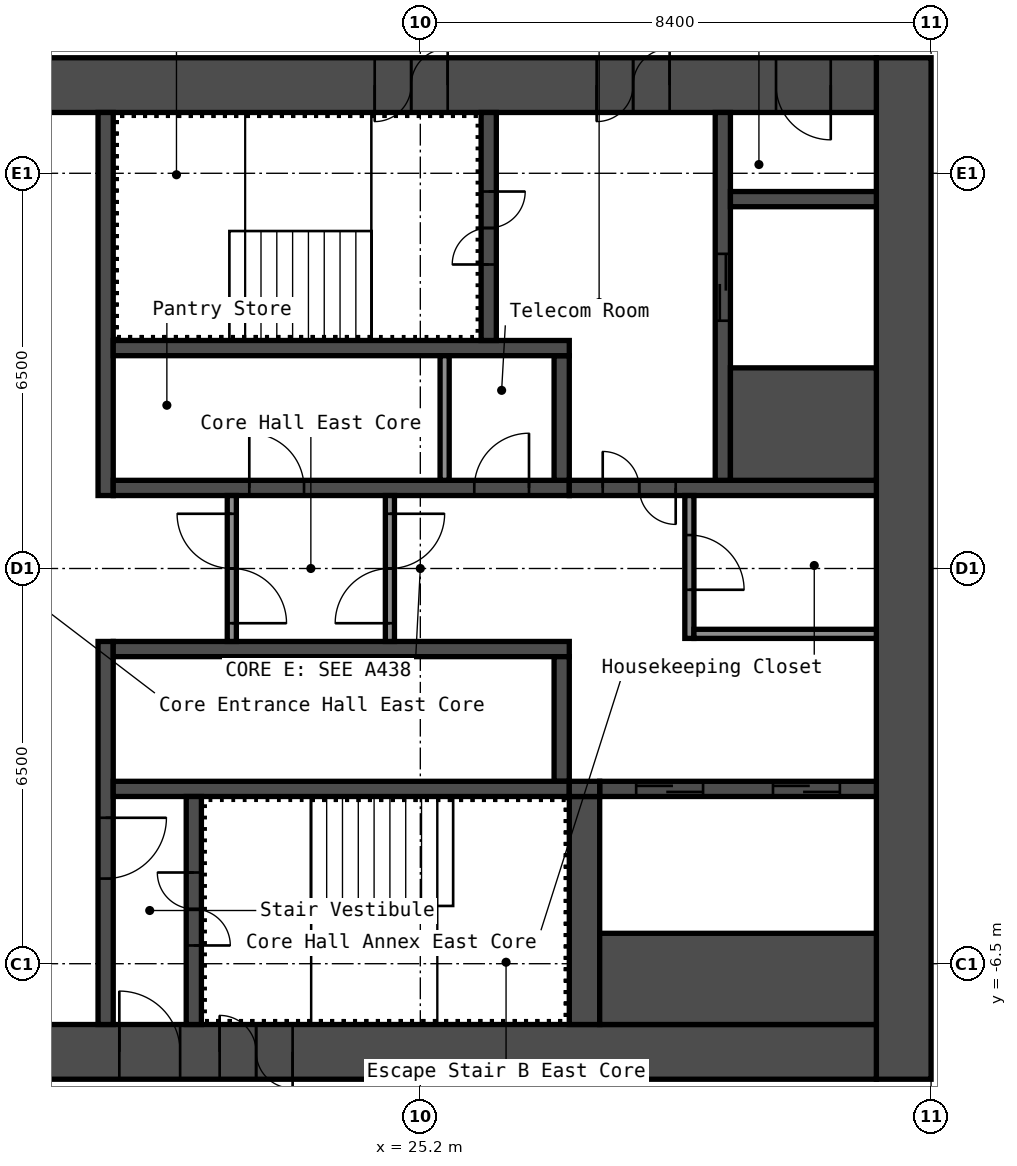
"""IFC4 building model, lengths in metres.
Left out: names, types, materials, properties, quantities, classifications, styles, units other than length and angle.
Written with IfcOpenShell. Run it as: python <this file> out.ifc"""

import sys

from ifc_helpers import new_model, si_unit, direction, frame, frame_2d, origin, place, context, subcontext, project, spatial, rectangle, extrude, element, fill, save


model = new_model("IFC4")
c1 = context("Model", 3, precision=1e-05, world=origin(), true_north=direction((0.0, 1.0)))
c2 = subcontext(c1, "Body", "Model", "MODEL_VIEW")
j1 = project(units=[si_unit("LENGTHUNIT", "METRE"), si_unit("PLANEANGLEUNIT", "RADIAN")], contexts=[c1])
p1 = place(None, origin())
s1 = spatial("IfcSite", under=j1, at=p1, CompositionType="ELEMENT")
p2 = place(p1, origin())
s2 = spatial("IfcBuilding", under=s1, at=p2, CompositionType="ELEMENT")
p3 = place(p2, frame((0.0, 0.0, 264.6)))
s3 = spatial("IfcBuildingStorey", under=s2, at=p3, CompositionType="ELEMENT", Elevation=264.6)
p4 = place(p3, frame((33.15, -8.4, 0.0), z_axis=(0.0, 0.0, 1.0), x_axis=(0.0, 1.0, 0.0)))
e1 = element("IfcWall", 1, at=p4, inside=s3, PredefinedType="SHEAR", context=c2, shape_type="SweptSolid", body=[
    extrude(rectangle(XDim=16.8, YDim=0.9, at=frame_2d((8.4, 0.0))), origin(), (0.0, 0.0, 1.0), 5.55),
])
p5 = place(p3, frame((17.7, 7.95, 0.0), z_axis=(0.0, 0.0, 1.0), x_axis=(1.0, 0.0, 0.0)))
e2 = element("IfcWall", 2, at=p5, inside=s3, PredefinedType="SHEAR", context=c2, shape_type="SweptSolid", body=[
    extrude(rectangle(XDim=15.0, YDim=0.9, at=frame_2d((7.5, 0.0))), origin(), (0.0, 0.0, 1.0), 5.55),
])
p6 = place(p5, frame((10.4, 0.0, 0.0)))
e3 = element("IfcOpeningElement", 3, at=p6, cuts=e2, PredefinedType="OPENING", context=c2, shape_type="SweptSolid", body=[
    extrude(rectangle(XDim=1.2, YDim=2.1, at=frame_2d((0.6, 1.05))), frame((0.0, 0.46, 0.0), z_axis=(0.0, -1.0, 0.0), x_axis=(1.0, 0.0, 0.0)), (0.0, 0.0, 1.0), 0.92),
])
p7 = place(p5, frame((13.35, 0.0, 0.0)))
e4 = element("IfcOpeningElement", 4, at=p7, cuts=e2, PredefinedType="OPENING", context=c2, shape_type="SweptSolid", body=[
    extrude(rectangle(XDim=0.9, YDim=2.1, at=frame_2d((0.45, 1.05))), frame((0.0, 0.46, 0.0), z_axis=(0.0, -1.0, 0.0), x_axis=(1.0, 0.0, 0.0)), (0.0, 0.0, 1.0), 0.92),
])
p8 = place(p5, frame((6.75, 0.0, 0.0)))
e5 = element("IfcOpeningElement", 5, at=p8, cuts=e2, PredefinedType="OPENING", context=c2, shape_type="SweptSolid", body=[
    extrude(rectangle(XDim=1.2, YDim=2.1, at=frame_2d((0.6, 1.05))), frame((0.0, 0.46, 0.0), z_axis=(0.0, -1.0, 0.0), x_axis=(1.0, 0.0, 0.0)), (0.0, 0.0, 1.0), 0.92),
])
p9 = place(p3, frame((17.7, -7.95, 0.0), z_axis=(0.0, 0.0, 1.0), x_axis=(1.0, 0.0, 0.0)))
e6 = element("IfcWall", 6, at=p9, inside=s3, PredefinedType="SHEAR", context=c2, shape_type="SweptSolid", body=[
    extrude(rectangle(XDim=15.0, YDim=0.9, at=frame_2d((7.5, 0.0))), origin(), (0.0, 0.0, 1.0), 5.55),
])
p10 = place(p9, frame((2.55, 0.0, 0.0)))
e7 = element("IfcOpeningElement", 7, at=p10, cuts=e6, PredefinedType="OPENING", context=c2, shape_type="SweptSolid", body=[
    extrude(rectangle(XDim=1.0, YDim=2.1, at=frame_2d((0.5, 1.05))), frame((0.0, 0.46, 0.0), z_axis=(0.0, -1.0, 0.0), x_axis=(1.0, 0.0, 0.0)), (0.0, 0.0, 1.0), 0.92),
])
p11 = place(p9, frame((4.2, 0.0, 0.0)))
e8 = element("IfcOpeningElement", 8, at=p11, cuts=e6, PredefinedType="OPENING", context=c2, shape_type="SweptSolid", body=[
    extrude(rectangle(XDim=1.2, YDim=2.1, at=frame_2d((0.6, 1.05))), frame((0.0, 0.46, 0.0), z_axis=(0.0, -1.0, 0.0), x_axis=(1.0, 0.0, 0.0)), (0.0, 0.0, 1.0), 0.92),
])
p12 = place(p3, frame((20.025, 1.2, 0.0), z_axis=(0.0, 0.0, 1.0), x_axis=(0.0, 1.0, 0.0)))
e9 = element("IfcWall", 9, at=p12, inside=s3, PredefinedType="SHEAR", context=c2, shape_type="SweptSolid", body=[
    extrude(rectangle(XDim=6.3, YDim=0.25, at=frame_2d((3.15, 0.0))), origin(), (0.0, 0.0, 1.0), 5.55),
])
p13 = place(p3, frame((20.025, -7.5, 0.0), z_axis=(0.0, 0.0, 1.0), x_axis=(0.0, 1.0, 0.0)))
e10 = element("IfcWall", 10, at=p13, inside=s3, PredefinedType="SHEAR", context=c2, shape_type="SweptSolid", body=[
    extrude(rectangle(XDim=6.3, YDim=0.25, at=frame_2d((3.15, 0.0))), origin(), (0.0, 0.0, 1.0), 5.55),
])
p14 = place(p13, frame((2.4, 0.0, 0.0)))
e11 = element("IfcOpeningElement", 11, at=p14, cuts=e10, PredefinedType="OPENING", context=c2, shape_type="SweptSolid", body=[
    extrude(rectangle(XDim=1.0, YDim=2.1, at=frame_2d((0.5, 1.05))), frame((0.0, 0.135, 0.0), z_axis=(0.0, -1.0, 0.0), x_axis=(1.0, 0.0, 0.0)), (0.0, 0.0, 1.0), 0.27),
])
p15 = place(p3, frame((20.15, 1.325, 0.0), z_axis=(0.0, 0.0, 1.0), x_axis=(1.0, 0.0, 0.0)))
e12 = element("IfcWall", 12, at=p15, inside=s3, PredefinedType="SHEAR", context=c2, shape_type="SweptSolid", body=[
    extrude(rectangle(XDim=7.5, YDim=0.25, at=frame_2d((3.75, 0.0))), origin(), (0.0, 0.0, 1.0), 5.55),
])
p16 = place(p15, frame((2.238, 0.0, 0.0)))
e13 = element("IfcOpeningElement", 13, at=p16, cuts=e12, PredefinedType="OPENING", context=c2, shape_type="SweptSolid", body=[
    extrude(rectangle(XDim=0.9, YDim=2.1, at=frame_2d((0.45, 1.05))), frame((0.0, 0.135, 0.0), z_axis=(0.0, -1.0, 0.0), x_axis=(1.0, 0.0, 0.0)), (0.0, 0.0, 1.0), 0.27),
])
p17 = place(p15, frame((5.938, 0.0, 0.0)))
e14 = element("IfcOpeningElement", 14, at=p17, cuts=e12, PredefinedType="OPENING", context=c2, shape_type="SweptSolid", body=[
    extrude(rectangle(XDim=0.9, YDim=2.1, at=frame_2d((0.45, 1.05))), frame((0.0, 0.135, 0.0), z_axis=(0.0, -1.0, 0.0), x_axis=(1.0, 0.0, 0.0)), (0.0, 0.0, 1.0), 0.27),
])
p18 = place(p3, frame((27.525, 1.45, 0.0), z_axis=(0.0, 0.0, 1.0), x_axis=(0.0, 1.0, 0.0)))
e15 = element("IfcWall", 15, at=p18, inside=s3, PredefinedType="SHEAR", context=c2, shape_type="SweptSolid", body=[
    extrude(rectangle(XDim=2.05, YDim=0.25, at=frame_2d((1.025, 0.0))), origin(), (0.0, 0.0, 1.0), 5.55),
])
p19 = place(p3, frame((20.15, 3.625, 0.0), z_axis=(0.0, 0.0, 1.0), x_axis=(1.0, 0.0, 0.0)))
e16 = element("IfcWall", 16, at=p19, inside=s3, PredefinedType="SHEAR", context=c2, shape_type="SweptSolid", body=[
    extrude(rectangle(XDim=7.5, YDim=0.25, at=frame_2d((3.75, 0.0))), origin(), (0.0, 0.0, 1.0), 5.55),
])
p20 = place(p3, frame((26.325, 3.75, 0.0), z_axis=(0.0, 0.0, 1.0), x_axis=(0.0, 1.0, 0.0)))
e17 = element("IfcWall", 17, at=p20, inside=s3, PredefinedType="SHEAR", context=c2, shape_type="SweptSolid", body=[
    extrude(rectangle(XDim=3.75, YDim=0.25, at=frame_2d((1.875, 0.0))), origin(), (0.0, 0.0, 1.0), 5.55),
])
p21 = place(p20, frame((1.25, 0.0, 0.0)))
e18 = element("IfcOpeningElement", 18, at=p21, cuts=e17, PredefinedType="OPENING", context=c2, shape_type="SweptSolid", body=[
    extrude(rectangle(XDim=1.2, YDim=2.1, at=frame_2d((0.6, 1.05))), frame((0.0, 0.135, 0.0), z_axis=(0.0, -1.0, 0.0), x_axis=(1.0, 0.0, 0.0)), (0.0, 0.0, 1.0), 0.27),
])
p22 = place(p3, frame((27.65, 1.325, 0.0), z_axis=(0.0, 0.0, 1.0), x_axis=(1.0, 0.0, 0.0)))
e19 = element("IfcWall", 19, at=p22, inside=s3, PredefinedType="SHEAR", context=c2, shape_type="SweptSolid", body=[
    extrude(rectangle(XDim=5.05, YDim=0.25, at=frame_2d((2.525, 0.0))), origin(), (0.0, 0.0, 1.0), 5.55),
])
p23 = place(p22, frame((0.55, 0.0, 0.0)))
e20 = element("IfcOpeningElement", 20, at=p23, cuts=e19, PredefinedType="OPENING", context=c2, shape_type="SweptSolid", body=[
    extrude(rectangle(XDim=1.2, YDim=2.1, at=frame_2d((0.6, 1.05))), frame((0.0, 0.135, 0.0), z_axis=(0.0, -1.0, 0.0), x_axis=(1.0, 0.0, 0.0)), (0.0, 0.0, 1.0), 0.27),
])
p24 = place(p3, frame((30.175, 1.45, 0.0), z_axis=(0.0, 0.0, 1.0), x_axis=(0.0, 1.0, 0.0)))
e21 = element("IfcWall", 21, at=p24, inside=s3, PredefinedType="SHEAR", context=c2, shape_type="SweptSolid", body=[
    extrude(rectangle(XDim=6.05, YDim=0.25, at=frame_2d((3.025, 0.0))), origin(), (0.0, 0.0, 1.0), 5.55),
])
p25 = place(p24, frame((2.625, 0.0, 0.0)))
e22 = element("IfcOpeningElement", 22, at=p25, cuts=e21, PredefinedType="OPENING", context=c2, shape_type="SweptSolid", body=[
    extrude(rectangle(XDim=1.1, YDim=2.1, at=frame_2d((0.55, 1.05))), frame((0.0, 0.135, 0.0), z_axis=(0.0, -1.0, 0.0), x_axis=(1.0, 0.0, 0.0)), (0.0, 0.0, 1.0), 0.27),
])
p26 = place(p3, frame((30.3, 2.375, 0.0), z_axis=(0.0, 0.0, 1.0), x_axis=(1.0, 0.0, 0.0)))
e23 = element("IfcWall", 23, at=p26, inside=s3, PredefinedType="SHEAR", context=c2, shape_type="SweptSolid", body=[
    extrude(rectangle(XDim=2.4, YDim=1.85, at=frame_2d((1.2, 0.0))), origin(), (0.0, 0.0, 1.0), 5.55),
])
p27 = place(p3, frame((30.3, 6.075, 0.0), z_axis=(0.0, 0.0, 1.0), x_axis=(1.0, 0.0, 0.0)))
e24 = element("IfcWall", 24, at=p27, inside=s3, PredefinedType="SHEAR", context=c2, shape_type="SweptSolid", body=[
    extrude(rectangle(XDim=2.4, YDim=0.25, at=frame_2d((1.2, 0.0))), origin(), (0.0, 0.0, 1.0), 5.55),
])
p28 = place(p3, frame((20.15, -1.325, 0.0), z_axis=(0.0, 0.0, 1.0), x_axis=(1.0, 0.0, 0.0)))
e25 = element("IfcWall", 25, at=p28, inside=s3, PredefinedType="SHEAR", context=c2, shape_type="SweptSolid", body=[
    extrude(rectangle(XDim=7.5, YDim=0.25, at=frame_2d((3.75, 0.0))), origin(), (0.0, 0.0, 1.0), 5.55),
])
p29 = place(p3, frame((27.525, -3.5, 0.0), z_axis=(0.0, 0.0, 1.0), x_axis=(0.0, 1.0, 0.0)))
e26 = element("IfcWall", 26, at=p29, inside=s3, PredefinedType="SHEAR", context=c2, shape_type="SweptSolid", body=[
    extrude(rectangle(XDim=2.05, YDim=0.25, at=frame_2d((1.025, 0.0))), origin(), (0.0, 0.0, 1.0), 5.55),
])
p30 = place(p3, frame((20.15, -3.625, 0.0), z_axis=(0.0, 0.0, 1.0), x_axis=(1.0, 0.0, 0.0)))
e27 = element("IfcWall", 27, at=p30, inside=s3, PredefinedType="SHEAR", context=c2, shape_type="SweptSolid", body=[
    extrude(rectangle(XDim=7.5, YDim=0.25, at=frame_2d((3.75, 0.0))), origin(), (0.0, 0.0, 1.0), 5.55),
])
p31 = place(p3, frame((21.475, -7.5, 0.0), z_axis=(0.0, 0.0, 1.0), x_axis=(0.0, 1.0, 0.0)))
e28 = element("IfcWall", 28, at=p31, inside=s3, PredefinedType="SHEAR", context=c2, shape_type="SweptSolid", body=[
    extrude(rectangle(XDim=3.75, YDim=0.25, at=frame_2d((1.875, 0.0))), origin(), (0.0, 0.0, 1.0), 5.55),
])
p32 = place(p31, frame((1.3, 0.0, 0.0)))
e29 = element("IfcOpeningElement", 29, at=p32, cuts=e28, PredefinedType="OPENING", context=c2, shape_type="SweptSolid", body=[
    extrude(rectangle(XDim=1.2, YDim=2.1, at=frame_2d((0.6, 1.05))), frame((0.0, 0.135, 0.0), z_axis=(0.0, -1.0, 0.0), x_axis=(1.0, 0.0, 0.0)), (0.0, 0.0, 1.0), 0.27),
])
p33 = place(p3, frame((27.9, -7.5, 0.0), z_axis=(0.0, 0.0, 1.0), x_axis=(0.0, 1.0, 0.0)))
e30 = element("IfcWall", 30, at=p33, inside=s3, PredefinedType="SHEAR", context=c2, shape_type="SweptSolid", body=[
    extrude(rectangle(XDim=3.75, YDim=0.5, at=frame_2d((1.875, 0.0))), origin(), (0.0, 0.0, 1.0), 5.55),
])
p34 = place(p3, frame((28.15, -3.625, 0.0), z_axis=(0.0, 0.0, 1.0), x_axis=(1.0, 0.0, 0.0)))
e31 = element("IfcWall", 31, at=p34, inside=s3, PredefinedType="SHEAR", context=c2, shape_type="SweptSolid", body=[
    extrude(rectangle(XDim=4.55, YDim=0.25, at=frame_2d((2.275, 0.0))), origin(), (0.0, 0.0, 1.0), 5.55),
])
p35 = place(p34, frame((0.6, 0.0, 0.0)))
e32 = element("IfcOpeningElement", 32, at=p35, cuts=e31, PredefinedType="OPENING", context=c2, shape_type="SweptSolid", body=[
    extrude(rectangle(XDim=1.1, YDim=2.1, at=frame_2d((0.55, 1.05))), frame((0.0, 0.135, 0.0), z_axis=(0.0, -1.0, 0.0), x_axis=(1.0, 0.0, 0.0)), (0.0, 0.0, 1.0), 0.27),
])
p36 = place(p34, frame((2.85, 0.0, 0.0)))
e33 = element("IfcOpeningElement", 33, at=p36, cuts=e31, PredefinedType="OPENING", context=c2, shape_type="SweptSolid", body=[
    extrude(rectangle(XDim=1.1, YDim=2.1, at=frame_2d((0.55, 1.05))), frame((0.0, 0.135, 0.0), z_axis=(0.0, -1.0, 0.0), x_axis=(1.0, 0.0, 0.0)), (0.0, 0.0, 1.0), 0.27),
])
p37 = place(p3, frame((28.15, -6.75, 0.0), z_axis=(0.0, 0.0, 1.0), x_axis=(1.0, 0.0, 0.0)))
e34 = element("IfcWall", 34, at=p37, inside=s3, PredefinedType="SHEAR", context=c2, shape_type="SweptSolid", body=[
    extrude(rectangle(XDim=4.55, YDim=1.5, at=frame_2d((2.275, 0.0))), origin(), (0.0, 0.0, 1.0), 5.55),
])
p38 = place(p3, frame((27.65, -3.625, 0.0), z_axis=(0.0, 0.0, 1.0), x_axis=(1.0, 0.0, 0.0)))
e35 = element("IfcWall", 35, at=p38, inside=s3, PredefinedType="SHEAR", context=c2, shape_type="SweptSolid", body=[
    extrude(rectangle(XDim=0.5, YDim=0.25, at=frame_2d((0.25, 0.0))), origin(), (0.0, 0.0, 1.0), 5.55),
])
p39 = place(p3, frame((22.1, -1.2, 0.0), z_axis=(0.0, 0.0, 1.0), x_axis=(0.0, 1.0, 0.0)))
e36 = element("IfcWall", 36, at=p39, inside=s3, PredefinedType="PARTITIONING", context=c2, shape_type="SweptSolid", body=[
    extrude(rectangle(XDim=2.4, YDim=0.15, at=frame_2d((1.2, 0.0))), origin(), (0.0, 0.0, 1.0), 5.55),
])
p40 = place(p39, frame((0.3, 0.0, 0.0)))
e37 = element("IfcOpeningElement", 37, at=p40, cuts=e36, PredefinedType="OPENING", context=c2, shape_type="SweptSolid", body=[
    extrude(rectangle(XDim=1.8, YDim=2.1, at=frame_2d((0.9, 1.05))), frame((0.0, 0.085, 0.0), z_axis=(0.0, -1.0, 0.0), x_axis=(1.0, 0.0, 0.0)), (0.0, 0.0, 1.0), 0.17),
])
p41 = place(p3, frame((24.7, -1.2, 0.0), z_axis=(0.0, 0.0, 1.0), x_axis=(0.0, 1.0, 0.0)))
e38 = element("IfcWall", 38, at=p41, inside=s3, PredefinedType="PARTITIONING", context=c2, shape_type="SweptSolid", body=[
    extrude(rectangle(XDim=2.4, YDim=0.15, at=frame_2d((1.2, 0.0))), origin(), (0.0, 0.0, 1.0), 5.55),
])
p42 = place(p41, frame((0.3, 0.0, 0.0)))
e39 = element("IfcOpeningElement", 39, at=p42, cuts=e38, PredefinedType="OPENING", context=c2, shape_type="SweptSolid", body=[
    extrude(rectangle(XDim=1.8, YDim=2.1, at=frame_2d((0.9, 1.05))), frame((0.0, 0.085, 0.0), z_axis=(0.0, -1.0, 0.0), x_axis=(1.0, 0.0, 0.0)), (0.0, 0.0, 1.0), 0.17),
])
p43 = place(p3, frame((29.625, -1.15, 0.0), z_axis=(0.0, 0.0, 1.0), x_axis=(0.0, 1.0, 0.0)))
e40 = element("IfcWall", 40, at=p43, inside=s3, PredefinedType="PARTITIONING", context=c2, shape_type="SweptSolid", body=[
    extrude(rectangle(XDim=2.35, YDim=0.15, at=frame_2d((1.175, 0.0))), origin(), (0.0, 0.0, 1.0), 5.55),
])
p44 = place(p43, frame((0.8, 0.0, 0.0)))
e41 = element("IfcOpeningElement", 41, at=p44, cuts=e40, PredefinedType="OPENING", context=c2, shape_type="SweptSolid", body=[
    extrude(rectangle(XDim=0.9, YDim=2.1, at=frame_2d((0.45, 1.05))), frame((0.0, 0.085, 0.0), z_axis=(0.0, -1.0, 0.0), x_axis=(1.0, 0.0, 0.0)), (0.0, 0.0, 1.0), 0.17),
])
p45 = place(p3, frame((29.7, -1.075, 0.0), z_axis=(0.0, 0.0, 1.0), x_axis=(1.0, 0.0, 0.0)))
e42 = element("IfcWall", 42, at=p45, inside=s3, PredefinedType="PARTITIONING", context=c2, shape_type="SweptSolid", body=[
    extrude(rectangle(XDim=3.0, YDim=0.15, at=frame_2d((1.5, 0.0))), origin(), (0.0, 0.0, 1.0), 5.55),
])
p46 = place(p3, frame((25.6, 1.45, 0.0), z_axis=(0.0, 0.0, 1.0), x_axis=(0.0, 1.0, 0.0)))
e43 = element("IfcWall", 43, at=p46, inside=s3, PredefinedType="PARTITIONING", context=c2, shape_type="SweptSolid", body=[
    extrude(rectangle(XDim=2.05, YDim=0.15, at=frame_2d((1.025, 0.0))), origin(), (0.0, 0.0, 1.0), 5.55),
])
p47 = place(p6, origin())
e44 = element("IfcDoor", 44, at=p47, inside=s3, OperationType="DOUBLE_DOOR_SINGLE_SWING", PredefinedType="DOOR", context=c2, shape_type="SweptSolid", body=[
    extrude(rectangle(XDim=1.2, YDim=2.1, at=frame_2d((0.6, 1.05))), frame((0.0, 0.025, 0.0), z_axis=(0.0, -1.0, 0.0), x_axis=(1.0, 0.0, 0.0)), (0.0, 0.0, 1.0), 0.05),
])
fill(e3, e44)
p48 = place(p7, origin())
e45 = element("IfcDoor", 45, at=p48, inside=s3, OperationType="SINGLE_SWING_RIGHT", PredefinedType="DOOR", context=c2, shape_type="SweptSolid", body=[
    extrude(rectangle(XDim=0.9, YDim=2.1, at=frame_2d((0.45, 1.05))), frame((0.0, 0.025, 0.0), z_axis=(0.0, -1.0, 0.0), x_axis=(1.0, 0.0, 0.0)), (0.0, 0.0, 1.0), 0.05),
])
fill(e4, e45)
p49 = place(p10, origin())
e46 = element("IfcDoor", 46, at=p49, inside=s3, OperationType="SINGLE_SWING_RIGHT", PredefinedType="DOOR", context=c2, shape_type="SweptSolid", body=[
    extrude(rectangle(XDim=1.0, YDim=2.1, at=frame_2d((0.5, 1.05))), frame((0.0, 0.025, 0.0), z_axis=(0.0, -1.0, 0.0), x_axis=(1.0, 0.0, 0.0)), (0.0, 0.0, 1.0), 0.05),
])
fill(e7, e46)
p50 = place(p8, origin())
e47 = element("IfcDoor", 47, at=p50, inside=s3, OperationType="DOUBLE_DOOR_SINGLE_SWING", PredefinedType="DOOR", context=c2, shape_type="SweptSolid", body=[
    extrude(rectangle(XDim=1.2, YDim=2.1, at=frame_2d((0.6, 1.05))), frame((0.0, 0.025, 0.0), z_axis=(0.0, -1.0, 0.0), x_axis=(1.0, 0.0, 0.0)), (0.0, 0.0, 1.0), 0.05),
])
fill(e5, e47)
p51 = place(p11, origin())
e48 = element("IfcDoor", 48, at=p51, inside=s3, OperationType="DOUBLE_DOOR_SINGLE_SWING", PredefinedType="DOOR", context=c2, shape_type="SweptSolid", body=[
    extrude(rectangle(XDim=1.2, YDim=2.1, at=frame_2d((0.6, 1.05))), frame((0.0, 0.025, 0.0), z_axis=(0.0, -1.0, 0.0), x_axis=(1.0, 0.0, 0.0)), (0.0, 0.0, 1.0), 0.05),
])
fill(e8, e48)
p52 = place(p21, origin())
e49 = element("IfcDoor", 49, at=p52, inside=s3, OperationType="DOUBLE_DOOR_SINGLE_SWING", PredefinedType="DOOR", context=c2, shape_type="SweptSolid", body=[
    extrude(rectangle(XDim=1.2, YDim=2.1, at=frame_2d((0.6, 1.05))), frame((0.0, 0.025, 0.0), z_axis=(0.0, -1.0, 0.0), x_axis=(1.0, 0.0, 0.0)), (0.0, 0.0, 1.0), 0.05),
])
fill(e18, e49)
p53 = place(p32, origin())
e50 = element("IfcDoor", 50, at=p53, inside=s3, OperationType="DOUBLE_DOOR_SINGLE_SWING", PredefinedType="DOOR", context=c2, shape_type="SweptSolid", body=[
    extrude(rectangle(XDim=1.2, YDim=2.1, at=frame_2d((0.6, 1.05))), frame((0.0, 0.025, 0.0), z_axis=(0.0, -1.0, 0.0), x_axis=(1.0, 0.0, 0.0)), (0.0, 0.0, 1.0), 0.05),
])
fill(e29, e50)
p54 = place(p14, origin())
e51 = element("IfcDoor", 51, at=p54, inside=s3, OperationType="SINGLE_SWING_RIGHT", PredefinedType="DOOR", context=c2, shape_type="SweptSolid", body=[
    extrude(rectangle(XDim=1.0, YDim=2.1, at=frame_2d((0.5, 1.05))), frame((0.0, 0.025, 0.0), z_axis=(0.0, -1.0, 0.0), x_axis=(1.0, 0.0, 0.0)), (0.0, 0.0, 1.0), 0.05),
])
fill(e11, e51)
p55 = place(p23, origin())
e52 = element("IfcDoor", 52, at=p55, inside=s3, OperationType="DOUBLE_DOOR_SINGLE_SWING", PredefinedType="DOOR", context=c2, shape_type="SweptSolid", body=[
    extrude(rectangle(XDim=1.2, YDim=2.1, at=frame_2d((0.6, 1.05))), frame((0.0, 0.025, 0.0), z_axis=(0.0, -1.0, 0.0), x_axis=(1.0, 0.0, 0.0)), (0.0, 0.0, 1.0), 0.05),
])
fill(e20, e52)
p56 = place(p40, origin())
e53 = element("IfcDoor", 53, at=p56, inside=s3, OperationType="DOUBLE_DOOR_SINGLE_SWING", PredefinedType="DOOR", context=c2, shape_type="SweptSolid", body=[
    extrude(rectangle(XDim=1.8, YDim=2.1, at=frame_2d((0.9, 1.05))), frame((0.0, 0.025, 0.0), z_axis=(0.0, -1.0, 0.0), x_axis=(1.0, 0.0, 0.0)), (0.0, 0.0, 1.0), 0.05),
])
fill(e37, e53)
p57 = place(p42, origin())
e54 = element("IfcDoor", 54, at=p57, inside=s3, OperationType="DOUBLE_DOOR_SINGLE_SWING", PredefinedType="DOOR", context=c2, shape_type="SweptSolid", body=[
    extrude(rectangle(XDim=1.8, YDim=2.1, at=frame_2d((0.9, 1.05))), frame((0.0, 0.025, 0.0), z_axis=(0.0, -1.0, 0.0), x_axis=(1.0, 0.0, 0.0)), (0.0, 0.0, 1.0), 0.05),
])
fill(e39, e54)
p58 = place(p44, origin())
e55 = element("IfcDoor", 55, at=p58, inside=s3, OperationType="SINGLE_SWING_LEFT", PredefinedType="DOOR", context=c2, shape_type="SweptSolid", body=[
    extrude(rectangle(XDim=0.9, YDim=2.1, at=frame_2d((0.45, 1.05))), frame((0.0, 0.025, 0.0), z_axis=(0.0, -1.0, 0.0), x_axis=(1.0, 0.0, 0.0)), (0.0, 0.0, 1.0), 0.05),
])
fill(e41, e55)
p59 = place(p16, origin())
e56 = element("IfcDoor", 56, at=p59, inside=s3, OperationType="SINGLE_SWING_RIGHT", PredefinedType="DOOR", context=c2, shape_type="SweptSolid", body=[
    extrude(rectangle(XDim=0.9, YDim=2.1, at=frame_2d((0.45, 1.05))), frame((0.0, 0.025, 0.0), z_axis=(0.0, -1.0, 0.0), x_axis=(1.0, 0.0, 0.0)), (0.0, 0.0, 1.0), 0.05),
])
fill(e13, e56)
p60 = place(p17, origin())
e57 = element("IfcDoor", 57, at=p60, inside=s3, OperationType="SINGLE_SWING_LEFT", PredefinedType="DOOR", context=c2, shape_type="SweptSolid", body=[
    extrude(rectangle(XDim=0.9, YDim=2.1, at=frame_2d((0.45, 1.05))), frame((0.0, 0.025, 0.0), z_axis=(0.0, -1.0, 0.0), x_axis=(1.0, 0.0, 0.0)), (0.0, 0.0, 1.0), 0.05),
])
fill(e14, e57)
p61 = place(p25, origin())
e58 = element("IfcDoor", 58, at=p61, inside=s3, OperationType="DOUBLE_DOOR_SLIDING", PredefinedType="DOOR", context=c2, shape_type="SweptSolid", body=[
    extrude(rectangle(XDim=1.1, YDim=2.1, at=frame_2d((0.55, 1.05))), frame((0.0, 0.025, 0.0), z_axis=(0.0, -1.0, 0.0), x_axis=(1.0, 0.0, 0.0)), (0.0, 0.0, 1.0), 0.05),
])
fill(e22, e58)
p62 = place(p35, origin())
e59 = element("IfcDoor", 59, at=p62, inside=s3, OperationType="DOUBLE_DOOR_SLIDING", PredefinedType="DOOR", context=c2, shape_type="SweptSolid", body=[
    extrude(rectangle(XDim=1.1, YDim=2.1, at=frame_2d((0.55, 1.05))), frame((0.0, 0.025, 0.0), z_axis=(0.0, -1.0, 0.0), x_axis=(1.0, 0.0, 0.0)), (0.0, 0.0, 1.0), 0.05),
])
fill(e32, e59)
p63 = place(p36, origin())
e60 = element("IfcDoor", 60, at=p63, inside=s3, OperationType="DOUBLE_DOOR_SLIDING", PredefinedType="DOOR", context=c2, shape_type="SweptSolid", body=[
    extrude(rectangle(XDim=1.1, YDim=2.1, at=frame_2d((0.55, 1.05))), frame((0.0, 0.025, 0.0), z_axis=(0.0, -1.0, 0.0), x_axis=(1.0, 0.0, 0.0)), (0.0, 0.0, 1.0), 0.05),
])
fill(e33, e60)
save(model, sys.argv[1])
